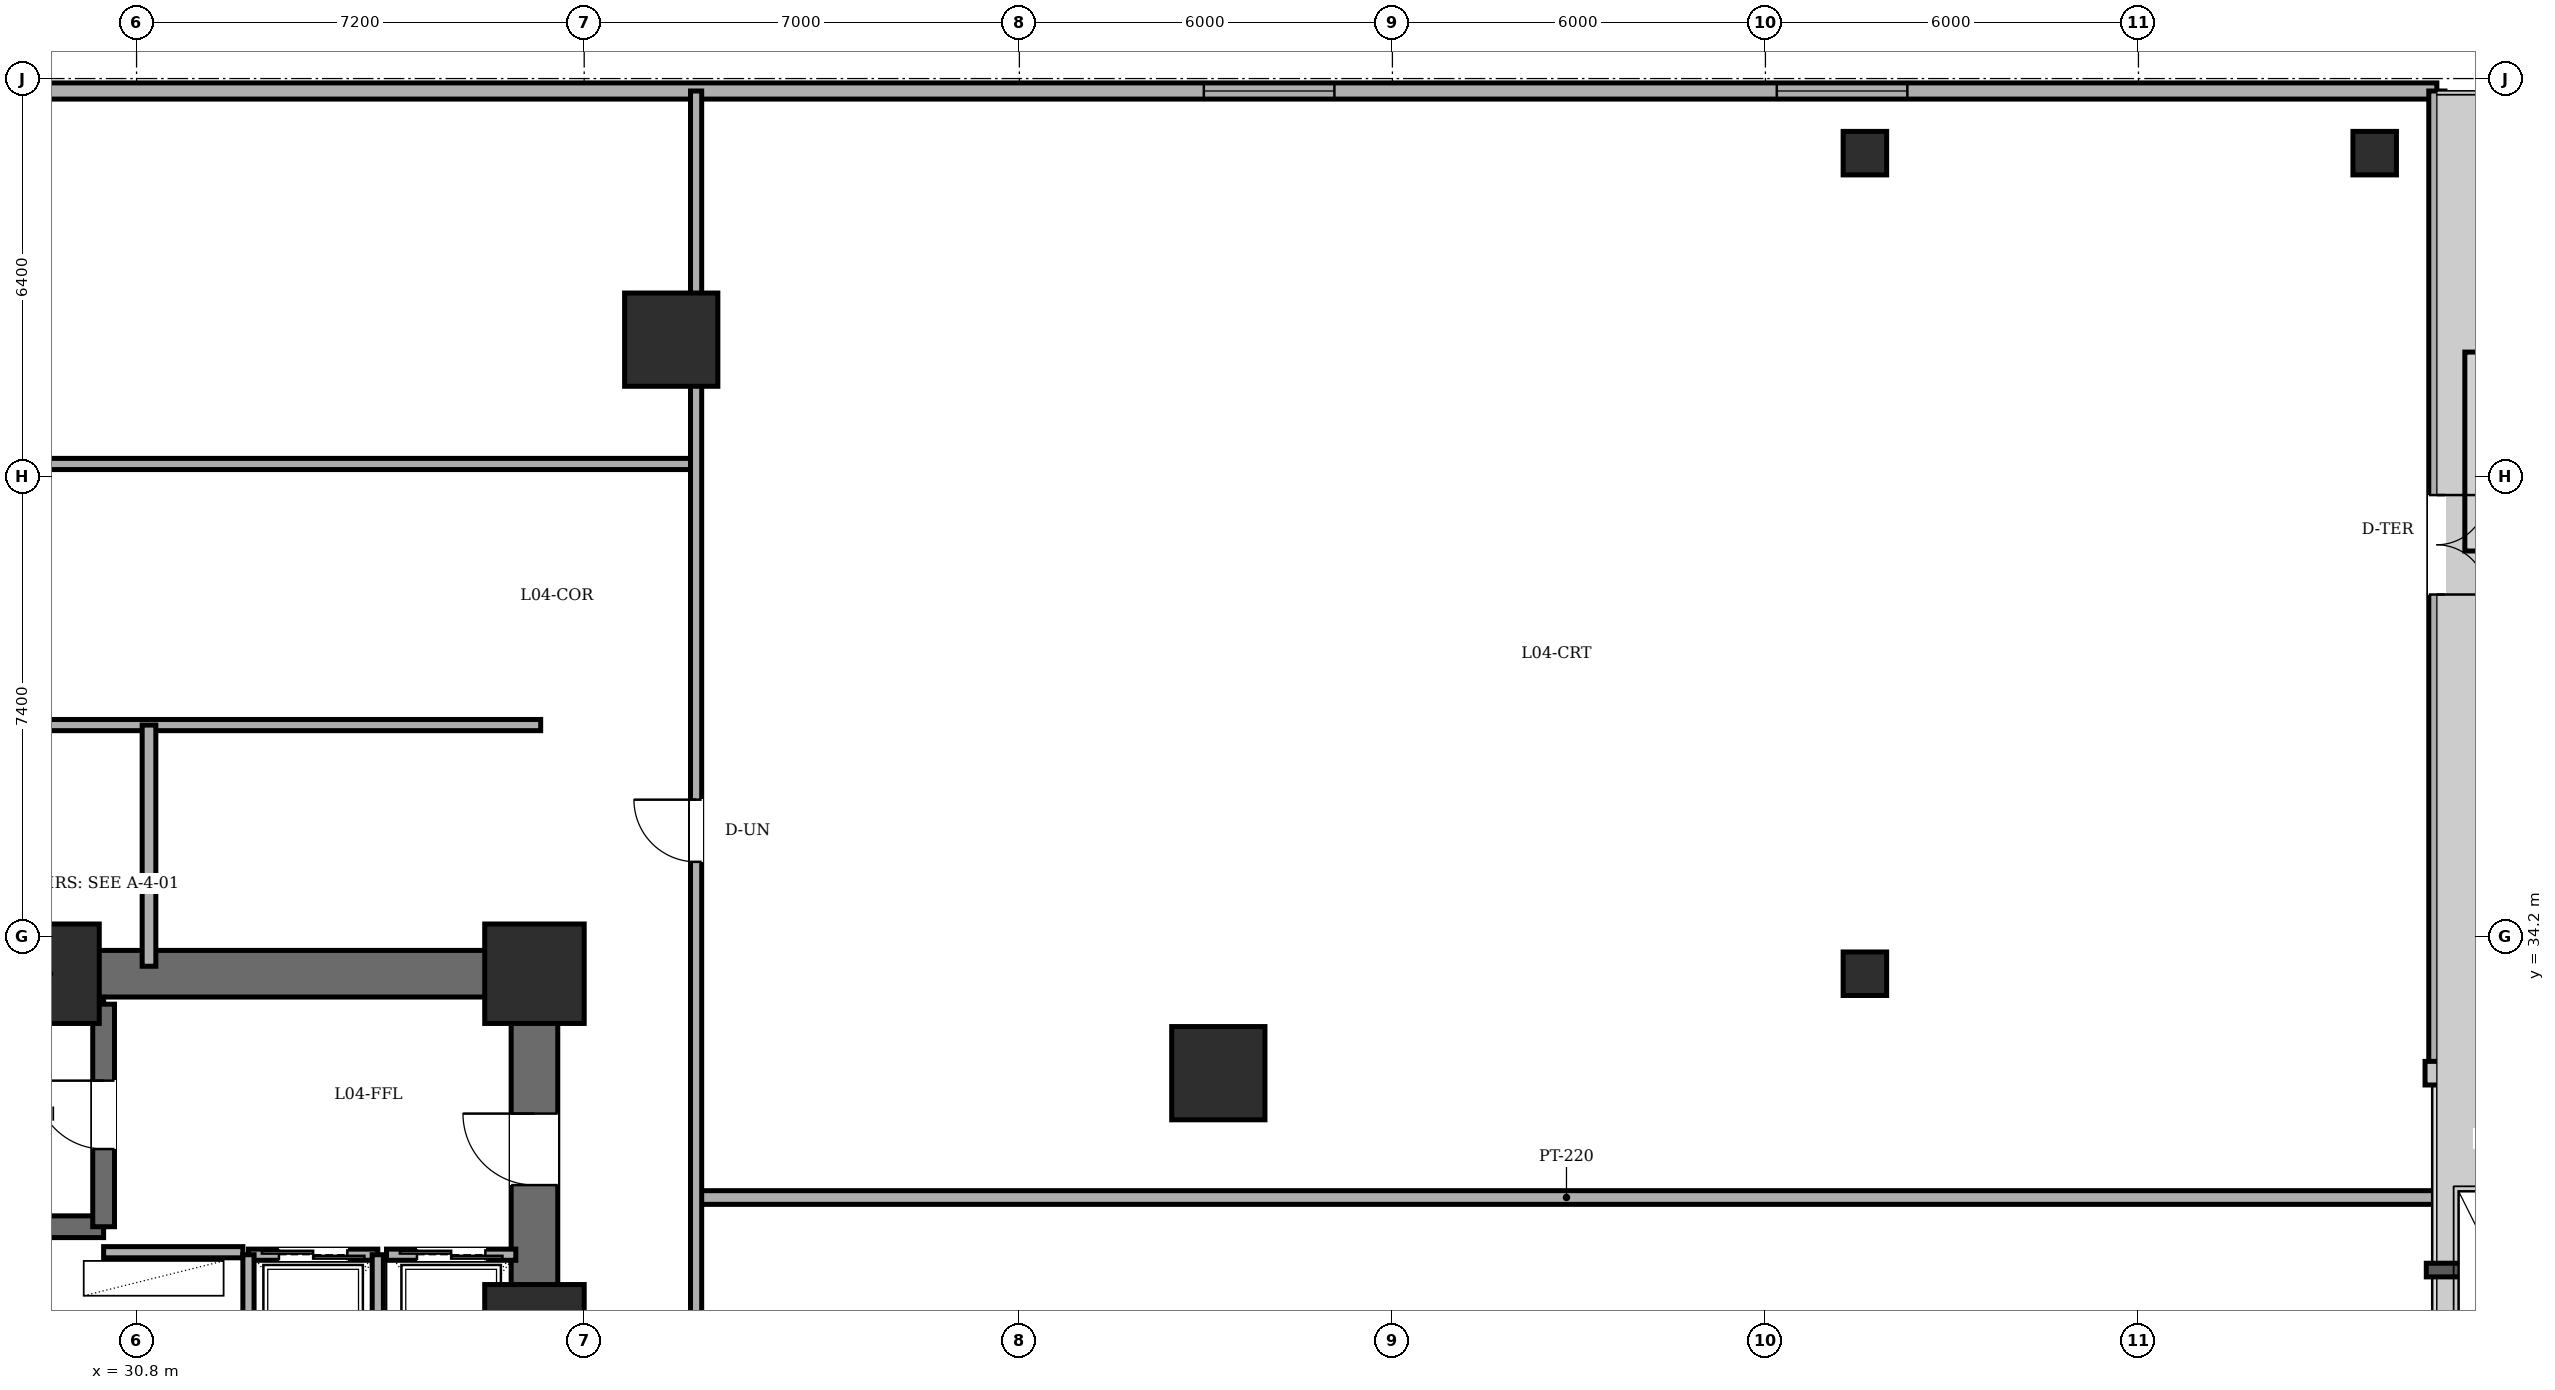
"""IFC4 building model, lengths in metres.
Left out: names, types, materials, properties, quantities, classifications, styles, units other than length and angle.
Written with IfcOpenShell. Run it as: python <this file> out.ifc"""

import sys

from ifc_helpers import new_model, si_unit, direction, frame, frame_2d, origin, origin_2d, place, context, subcontext, project, spatial, rectangle, circle, extrude, element, fill, save


model = new_model("IFC4")
c1 = context("Model", 3, precision=1e-05, world=origin(), true_north=direction((0.0, 1.0)))
c2 = subcontext(c1, "Body", "Model", "MODEL_VIEW")
j1 = project(units=[si_unit("LENGTHUNIT", "METRE"), si_unit("PLANEANGLEUNIT", "RADIAN")], contexts=[c1])
p1 = place(None, origin())
s1 = spatial("IfcSite", under=j1, at=p1, CompositionType="ELEMENT")
p2 = place(p1, origin())
s2 = spatial("IfcBuilding", under=s1, at=p2, CompositionType="ELEMENT")
p3 = place(p2, frame((0.0, 0.0, 14.7)))
s3 = spatial("IfcBuildingStorey", under=s2, at=p3, CompositionType="ELEMENT", Elevation=14.7)
for number, where, z_axis, x_axis in (
    (1, (37.2, 27.8, 0.0), (0.0, 0.0, 1.0), (1.0, 0.0, 0.0)),
    (2, (37.2, 33.6, 0.0), (0.0, 0.0, 1.0), (1.0, 0.0, 0.0)),
    (3, (29.4, 33.6, 0.0), (0.0, 0.0, 1.0), (1.0, 0.0, 0.0)),
):
    element("IfcColumn", number, at=place(p3, frame(where, z_axis=z_axis, x_axis=x_axis)), inside=s3, PredefinedType="COLUMN", context=c2, shape_type="SweptSolid", body=[
        extrude(rectangle(XDim=1.6, YDim=1.6, at=origin_2d()), origin(), (0.0, 0.0, 1.0), 4.65),
    ])
for number, where, z_axis, x_axis in (
    (4, (48.2, 32.0, 0.0), (0.0, 0.0, 1.0), (1.0, 0.0, 0.0)),
    (5, (39.4, 43.8, 0.0), (0.0, 0.0, 1.0), (1.0, 0.0, 0.0)),
):
    element("IfcColumn", number, at=place(p3, frame(where, z_axis=z_axis, x_axis=x_axis)), inside=s3, PredefinedType="COLUMN", context=c2, shape_type="SweptSolid", body=[
        extrude(circle(Radius=0.75, at=origin_2d()), origin(), (0.0, 0.0, 1.0), 4.65),
    ])
for number, where, z_axis, x_axis in (
    (6, (58.6, 46.8, 0.0), (0.0, 0.0, 1.0), (1.0, 0.0, 0.0)),
    (7, (58.6, 33.6, 0.0), (0.0, 0.0, 1.0), (1.0, 0.0, 0.0)),
    (8, (66.8, 46.8, 0.0), (0.0, 0.0, 1.0), (1.0, 0.0, 0.0)),
):
    element("IfcColumn", number, at=place(p3, frame(where, z_axis=z_axis, x_axis=x_axis)), inside=s3, PredefinedType="COLUMN", context=c2, shape_type="SweptSolid", body=[
        extrude(rectangle(XDim=0.7, YDim=0.7, at=origin_2d()), origin(), (0.0, 0.0, 1.0), 4.65),
    ])
p4 = place(p3, frame((1.6, 47.8, 0.0), z_axis=(0.0, 0.0, 1.0), x_axis=(1.0, 0.0, 0.0)))
e9 = element("IfcWall", 9, at=p4, inside=s3, PredefinedType="SOLIDWALL", context=c2, shape_type="SweptSolid", body=[
    extrude(rectangle(XDim=66.2, YDim=0.26, at=frame_2d((33.1, 0.0))), origin(), (0.0, 0.0, 1.0), 4.45),
])
p5 = place(p4, frame((11.917, 0.0, 0.9)))
e10 = element("IfcOpeningElement", 10, at=p5, cuts=e9, PredefinedType="OPENING", context=c2, shape_type="SweptSolid", body=[
    extrude(rectangle(XDim=2.1, YDim=2.0, at=frame_2d((1.05, 1.0))), frame((0.0, 0.14, 0.0), z_axis=(0.0, -1.0, 0.0), x_axis=(1.0, 0.0, 0.0)), (0.0, 0.0, 1.0), 0.28),
])
p6 = place(p4, frame((24.533, 0.0, 0.9)))
e11 = element("IfcOpeningElement", 11, at=p6, cuts=e9, PredefinedType="OPENING", context=c2, shape_type="SweptSolid", body=[
    extrude(rectangle(XDim=2.1, YDim=2.0, at=frame_2d((1.05, 1.0))), frame((0.0, 0.14, 0.0), z_axis=(0.0, -1.0, 0.0), x_axis=(1.0, 0.0, 0.0)), (0.0, 0.0, 1.0), 0.28),
])
p7 = place(p4, frame((46.367, 0.0, 0.9)))
e12 = element("IfcOpeningElement", 12, at=p7, cuts=e9, PredefinedType="OPENING", context=c2, shape_type="SweptSolid", body=[
    extrude(rectangle(XDim=2.1, YDim=2.0, at=frame_2d((1.05, 1.0))), frame((0.0, 0.14, 0.0), z_axis=(0.0, -1.0, 0.0), x_axis=(1.0, 0.0, 0.0)), (0.0, 0.0, 1.0), 0.28),
])
p8 = place(p4, frame((55.583, 0.0, 0.9)))
e13 = element("IfcOpeningElement", 13, at=p8, cuts=e9, PredefinedType="OPENING", context=c2, shape_type="SweptSolid", body=[
    extrude(rectangle(XDim=2.1, YDim=2.0, at=frame_2d((1.05, 1.0))), frame((0.0, 0.14, 0.0), z_axis=(0.0, -1.0, 0.0), x_axis=(1.0, 0.0, 0.0)), (0.0, 0.0, 1.0), 0.28),
])
p9 = place(p3, frame((67.8, 47.8, 0.0), z_axis=(0.0, 0.0, 1.0), x_axis=(0.0, -1.0, 0.0)))
e14 = element("IfcWall", 14, at=p9, inside=s3, PredefinedType="SOLIDWALL", context=c2, shape_type="SweptSolid", body=[
    extrude(rectangle(XDim=15.8, YDim=0.26, at=frame_2d((7.9, 0.0))), origin(), (0.0, 0.0, 1.0), 4.45),
])
p10 = place(p9, frame((6.5, 0.0, 0.0)))
e15 = element("IfcOpeningElement", 15, at=p10, cuts=e14, PredefinedType="OPENING", context=c2, shape_type="SweptSolid", body=[
    extrude(rectangle(XDim=1.6, YDim=2.3, at=frame_2d((0.8, 1.15))), frame((0.0, 0.14, 0.0), z_axis=(0.0, -1.0, 0.0), x_axis=(1.0, 0.0, 0.0)), (0.0, 0.0, 1.0), 0.28),
])
p11 = place(p3, frame((21.6, 33.6, 0.0), z_axis=(0.0, 0.0, 1.0), x_axis=(1.0, 0.0, 0.0)))
e16 = element("IfcWall", 16, at=p11, inside=s3, PredefinedType="SHEAR", context=c2, shape_type="SweptSolid", body=[
    extrude(rectangle(XDim=15.6, YDim=0.75, at=frame_2d((7.8, 0.0))), origin(), (0.0, 0.0, 1.0), 4.45),
])
p12 = place(p3, frame((37.2, 14.4, 0.0), z_axis=(0.0, 0.0, 1.0), x_axis=(0.0, 1.0, 0.0)))
e17 = element("IfcWall", 17, at=p12, inside=s3, PredefinedType="SHEAR", context=c2, shape_type="SweptSolid", body=[
    extrude(rectangle(XDim=19.2, YDim=0.75, at=frame_2d((9.6, 0.0))), origin(), (0.0, 0.0, 1.0), 4.45),
])
p13 = place(p12, frame((15.8, 0.0, 0.0)))
e18 = element("IfcOpeningElement", 18, at=p13, cuts=e17, PredefinedType="OPENING", context=c2, shape_type="SweptSolid", body=[
    extrude(rectangle(XDim=1.15, YDim=2.15, at=frame_2d((0.575, 1.075))), frame((0.0, 0.385, 0.0), z_axis=(0.0, -1.0, 0.0), x_axis=(1.0, 0.0, 0.0)), (0.0, 0.0, 1.0), 0.77),
])
p14 = place(p12, frame((3.6, 0.0, 0.0)))
e19 = element("IfcOpeningElement", 19, at=p14, cuts=e17, PredefinedType="OPENING", context=c2, shape_type="SweptSolid", body=[
    extrude(rectangle(XDim=1.1, YDim=2.15, at=frame_2d((0.55, 1.075))), frame((0.0, 0.385, 0.0), z_axis=(0.0, -1.0, 0.0), x_axis=(1.0, 0.0, 0.0)), (0.0, 0.0, 1.0), 0.77),
])
p15 = place(p12, frame((8.6, 0.0, 0.0)))
e20 = element("IfcOpeningElement", 20, at=p15, cuts=e17, PredefinedType="OPENING", context=c2, shape_type="SweptSolid", body=[
    extrude(rectangle(XDim=1.3, YDim=2.2, at=frame_2d((0.65, 1.1))), frame((0.0, 0.385, 0.0), z_axis=(0.0, -1.0, 0.0), x_axis=(1.0, 0.0, 0.0)), (0.0, 0.0, 1.0), 0.77),
])
p16 = place(p3, frame((22.48, 29.53, 0.0), z_axis=(0.0, 0.0, 1.0), x_axis=(1.0, 0.0, 0.0)))
e21 = element("IfcWall", 21, at=p16, inside=s3, PredefinedType="SOLIDWALL", context=c2, shape_type="SweptSolid", body=[
    extrude(rectangle(XDim=7.79, YDim=0.35, at=frame_2d((3.895, 0.0))), origin(), (0.0, 0.0, 1.0), 4.45),
])
p17 = place(p3, frame((22.48, 33.11, 0.0), z_axis=(0.0, 0.0, 1.0), x_axis=(1.0, 0.0, 0.0)))
e22 = element("IfcWall", 22, at=p17, inside=s3, PredefinedType="PARTITIONING", context=c2, shape_type="SweptSolid", body=[
    extrude(rectangle(XDim=7.79, YDim=0.22, at=frame_2d((3.895, 0.0))), origin(), (0.0, 0.0, 1.0), 4.45),
])
p18 = place(p3, frame((30.27, 29.53, 0.0), z_axis=(0.0, 0.0, 1.0), x_axis=(0.0, 1.0, 0.0)))
e23 = element("IfcWall", 23, at=p18, inside=s3, PredefinedType="SOLIDWALL", context=c2, shape_type="SweptSolid", body=[
    extrude(rectangle(XDim=3.58, YDim=0.35, at=frame_2d((1.79, 0.0))), origin(), (0.0, 0.0, 1.0), 4.45),
])
p19 = place(p18, frame((1.25, 0.0, 0.0)))
e24 = element("IfcOpeningElement", 24, at=p19, cuts=e23, PredefinedType="OPENING", context=c2, shape_type="SweptSolid", body=[
    extrude(rectangle(XDim=1.1, YDim=2.15, at=frame_2d((0.55, 1.075))), frame((0.0, 0.185, 0.0), z_axis=(0.0, -1.0, 0.0), x_axis=(1.0, 0.0, 0.0)), (0.0, 0.0, 1.0), 0.37),
])
p20 = place(p3, frame((30.27, 29.12, 0.0), z_axis=(0.0, 0.0, 1.0), x_axis=(1.0, 0.0, 0.0)))
e25 = element("IfcWall", 25, at=p20, inside=s3, PredefinedType="PARTITIONING", context=c2, shape_type="SweptSolid", body=[
    extrude(rectangle(XDim=2.24, YDim=0.18, at=frame_2d((1.12, 0.0))), origin(), (0.0, 0.0, 1.0), 4.45),
])
p21 = place(p3, frame((32.6, 29.08, 0.0), z_axis=(0.0, 0.0, 1.0), x_axis=(1.0, 0.0, 0.0)))
e26 = element("IfcWall", 26, at=p21, inside=s3, PredefinedType="PARTITIONING", context=c2, shape_type="SweptSolid", body=[
    extrude(rectangle(XDim=2.08, YDim=0.18, at=frame_2d((1.04, 0.0))), origin(), (0.0, 0.0, 1.0), 4.45),
])
p22 = place(p21, frame((0.49, 0.0, 0.0)))
e27 = element("IfcOpeningElement", 27, at=p22, cuts=e26, PredefinedType="OPENING", context=c2, shape_type="SweptSolid", body=[
    extrude(rectangle(XDim=1.1, YDim=2.2, at=frame_2d((0.55, 1.1))), frame((0.0, 0.1, 0.0), z_axis=(0.0, -1.0, 0.0), x_axis=(1.0, 0.0, 0.0)), (0.0, 0.0, 1.0), 0.2),
])
for number, where, z_axis, x_axis in (
    (28, (34.68, 26.35, 0.0), (0.0, 0.0, 1.0), (0.0, 1.0, 0.0)),
    (29, (32.6, 29.08, 0.0), (0.0, 0.0, 1.0), (0.0, -1.0, 0.0)),
):
    element("IfcWall", number, at=place(p3, frame(where, z_axis=z_axis, x_axis=x_axis)), inside=s3, PredefinedType="PARTITIONING", context=c2, shape_type="SweptSolid", body=[
        extrude(rectangle(XDim=2.73, YDim=0.18, at=frame_2d((1.365, 0.0))), origin(), (0.0, 0.0, 1.0), 4.45),
    ])
p23 = place(p3, frame((34.82, 29.08, 0.0), z_axis=(0.0, 0.0, 1.0), x_axis=(1.0, 0.0, 0.0)))
e30 = element("IfcWall", 30, at=p23, inside=s3, PredefinedType="PARTITIONING", context=c2, shape_type="SweptSolid", body=[
    extrude(rectangle(XDim=2.08, YDim=0.18, at=frame_2d((1.04, 0.0))), origin(), (0.0, 0.0, 1.0), 4.45),
])
p24 = place(p23, frame((0.49, 0.0, 0.0)))
e31 = element("IfcOpeningElement", 31, at=p24, cuts=e30, PredefinedType="OPENING", context=c2, shape_type="SweptSolid", body=[
    extrude(rectangle(XDim=1.1, YDim=2.2, at=frame_2d((0.55, 1.1))), frame((0.0, 0.1, 0.0), z_axis=(0.0, -1.0, 0.0), x_axis=(1.0, 0.0, 0.0)), (0.0, 0.0, 1.0), 0.2),
])
p25 = place(p3, frame((39.8, 30.0, 0.0), z_axis=(0.0, 0.0, 1.0), x_axis=(1.0, 0.0, 0.0)))
e32 = element("IfcWall", 32, at=p25, inside=s3, PredefinedType="PARTITIONING", context=c2, shape_type="SweptSolid", body=[
    extrude(rectangle(XDim=28.0, YDim=0.22, at=frame_2d((14.0, 0.0))), origin(), (0.0, 0.0, 1.0), 4.45),
])
p26 = place(p3, frame((17.85, 37.6, 0.0), z_axis=(0.0, 0.0, 1.0), x_axis=(1.0, 0.0, 0.0)))
e33 = element("IfcWall", 33, at=p26, inside=s3, PredefinedType="PARTITIONING", context=c2, shape_type="SweptSolid", body=[
    extrude(rectangle(XDim=19.45, YDim=0.18, at=frame_2d((9.725, 0.0))), origin(), (0.0, 0.0, 1.0), 4.45),
])
p27 = place(p26, frame((7.99, 0.0, 0.0)))
e34 = element("IfcOpeningElement", 34, at=p27, cuts=e33, PredefinedType="OPENING", context=c2, shape_type="SweptSolid", body=[
    extrude(rectangle(XDim=0.92, YDim=2.1, at=frame_2d((0.46, 1.05))), frame((0.0, 0.1, 0.0), z_axis=(0.0, -1.0, 0.0), x_axis=(1.0, 0.0, 0.0)), (0.0, 0.0, 1.0), 0.2),
])
p28 = place(p3, frame((17.89, 41.8, 0.0), z_axis=(0.0, 0.0, 1.0), x_axis=(1.0, 0.0, 0.0)))
e35 = element("IfcWall", 35, at=p28, inside=s3, PredefinedType="PARTITIONING", context=c2, shape_type="SweptSolid", body=[
    extrude(rectangle(XDim=21.91, YDim=0.18, at=frame_2d((10.955, 0.0))), origin(), (0.0, 0.0, 1.0), 4.45),
])
p29 = place(p3, frame((31.0, 33.72, 0.0), z_axis=(0.0, 0.0, 1.0), x_axis=(0.0, 1.0, 0.0)))
e36 = element("IfcWall", 36, at=p29, inside=s3, PredefinedType="PARTITIONING", context=c2, shape_type="SweptSolid", body=[
    extrude(rectangle(XDim=3.88, YDim=0.22, at=frame_2d((1.94, 0.0))), origin(), (0.0, 0.0, 1.0), 4.45),
])
p30 = place(p3, frame((39.8, 0.2, 0.0), z_axis=(0.0, 0.0, 1.0), x_axis=(0.0, 1.0, 0.0)))
e37 = element("IfcWall", 37, at=p30, inside=s3, PredefinedType="PARTITIONING", context=c2, shape_type="SweptSolid", body=[
    extrude(rectangle(XDim=47.6, YDim=0.18, at=frame_2d((23.8, 0.0))), origin(), (0.0, 0.0, 1.0), 4.45),
])
p31 = place(p30, frame((17.44, 0.0, 0.0)))
e38 = element("IfcOpeningElement", 38, at=p31, cuts=e37, PredefinedType="OPENING", context=c2, shape_type="SweptSolid", body=[
    extrude(rectangle(XDim=0.92, YDim=2.1, at=frame_2d((0.46, 1.05))), frame((0.0, 0.1, 0.0), z_axis=(0.0, -1.0, 0.0), x_axis=(1.0, 0.0, 0.0)), (0.0, 0.0, 1.0), 0.2),
])
p32 = place(p30, frame((35.2, 0.0, 0.0)))
e39 = element("IfcOpeningElement", 39, at=p32, cuts=e37, PredefinedType="OPENING", context=c2, shape_type="SweptSolid", body=[
    extrude(rectangle(XDim=1.0, YDim=2.15, at=frame_2d((0.5, 1.075))), frame((0.0, 0.1, 0.0), z_axis=(0.0, -1.0, 0.0), x_axis=(1.0, 0.0, 0.0)), (0.0, 0.0, 1.0), 0.2),
])
p33 = place(p10, origin())
e40 = element("IfcDoor", 40, at=p33, inside=s3, OperationType="DOUBLE_DOOR_SINGLE_SWING", PredefinedType="DOOR", context=c2, shape_type="SweptSolid", body=[
    extrude(rectangle(XDim=1.6, YDim=2.3, at=frame_2d((0.8, 1.15))), frame((0.0, 0.025, 0.0), z_axis=(0.0, -1.0, 0.0), x_axis=(1.0, 0.0, 0.0)), (0.0, 0.0, 1.0), 0.05),
])
fill(e15, e40)
p34 = place(p7, origin())
e41 = element("IfcWindow", 41, at=p34, inside=s3, PartitioningType="DOUBLE_PANEL_VERTICAL", PredefinedType="WINDOW", context=c2, shape_type="SweptSolid", body=[
    extrude(rectangle(XDim=2.1, YDim=2.0, at=frame_2d((1.05, 1.0))), frame((0.0, 0.03, 0.0), z_axis=(0.0, -1.0, 0.0), x_axis=(1.0, 0.0, 0.0)), (0.0, 0.0, 1.0), 0.06),
])
fill(e12, e41)
p35 = place(p8, origin())
e42 = element("IfcWindow", 42, at=p35, inside=s3, PartitioningType="DOUBLE_PANEL_VERTICAL", PredefinedType="WINDOW", context=c2, shape_type="SweptSolid", body=[
    extrude(rectangle(XDim=2.1, YDim=2.0, at=frame_2d((1.05, 1.0))), frame((0.0, 0.03, 0.0), z_axis=(0.0, -1.0, 0.0), x_axis=(1.0, 0.0, 0.0)), (0.0, 0.0, 1.0), 0.06),
])
fill(e13, e42)
p36 = place(p3, frame((0.0, 0.0, -0.21)))
p37 = place(p36, frame((68.8, 28.8, 0.0)))
p38 = place(p37, frame((0.0, 0.0, 0.16)))
e43 = element("IfcWindow", 43, at=p38, inside=s3, PartitioningType="SINGLE_PANEL", PredefinedType="SKYLIGHT", context=c2, shape_type="SweptSolid", body=[
    extrude(rectangle(XDim=1.3, YDim=2.6, at=origin_2d()), origin(), (0.0, 0.0, 1.0), 0.05),
])
p39 = place(p19, origin())
e44 = element("IfcDoor", 44, at=p39, inside=s3, OperationType="SINGLE_SWING_RIGHT", PredefinedType="DOOR", context=c2, shape_type="SweptSolid", body=[
    extrude(rectangle(XDim=1.1, YDim=2.15, at=frame_2d((0.55, 1.075))), frame((0.0, 0.025, 0.0), z_axis=(0.0, -1.0, 0.0), x_axis=(1.0, 0.0, 0.0)), (0.0, 0.0, 1.0), 0.05),
])
fill(e24, e44)
p40 = place(p13, origin())
e45 = element("IfcDoor", 45, at=p40, inside=s3, OperationType="SINGLE_SWING_RIGHT", PredefinedType="DOOR", context=c2, shape_type="SweptSolid", body=[
    extrude(rectangle(XDim=1.15, YDim=2.15, at=frame_2d((0.575, 1.075))), frame((0.0, 0.025, 0.0), z_axis=(0.0, -1.0, 0.0), x_axis=(1.0, 0.0, 0.0)), (0.0, 0.0, 1.0), 0.05),
])
fill(e18, e45)
p41 = place(p22, origin())
e46 = element("IfcDoor", 46, at=p41, inside=s3, OperationType="DOUBLE_DOOR_SLIDING", PredefinedType="DOOR", context=c2, shape_type="SweptSolid", body=[
    extrude(rectangle(XDim=1.1, YDim=2.2, at=frame_2d((0.55, 1.1))), frame((0.0, 0.025, 0.0), z_axis=(0.0, -1.0, 0.0), x_axis=(1.0, 0.0, 0.0)), (0.0, 0.0, 1.0), 0.05),
])
fill(e27, e46)
p42 = place(p24, origin())
e47 = element("IfcDoor", 47, at=p42, inside=s3, OperationType="DOUBLE_DOOR_SLIDING", PredefinedType="DOOR", context=c2, shape_type="SweptSolid", body=[
    extrude(rectangle(XDim=1.1, YDim=2.2, at=frame_2d((0.55, 1.1))), frame((0.0, 0.025, 0.0), z_axis=(0.0, -1.0, 0.0), x_axis=(1.0, 0.0, 0.0)), (0.0, 0.0, 1.0), 0.05),
])
fill(e31, e47)
p43 = place(p32, origin())
e48 = element("IfcDoor", 48, at=p43, inside=s3, OperationType="SINGLE_SWING_RIGHT", PredefinedType="DOOR", context=c2, shape_type="SweptSolid", body=[
    extrude(rectangle(XDim=1.0, YDim=2.15, at=frame_2d((0.5, 1.075))), frame((0.0, 0.025, 0.0), z_axis=(0.0, -1.0, 0.0), x_axis=(1.0, 0.0, 0.0)), (0.0, 0.0, 1.0), 0.05),
])
fill(e39, e48)
save(model, sys.argv[1])
